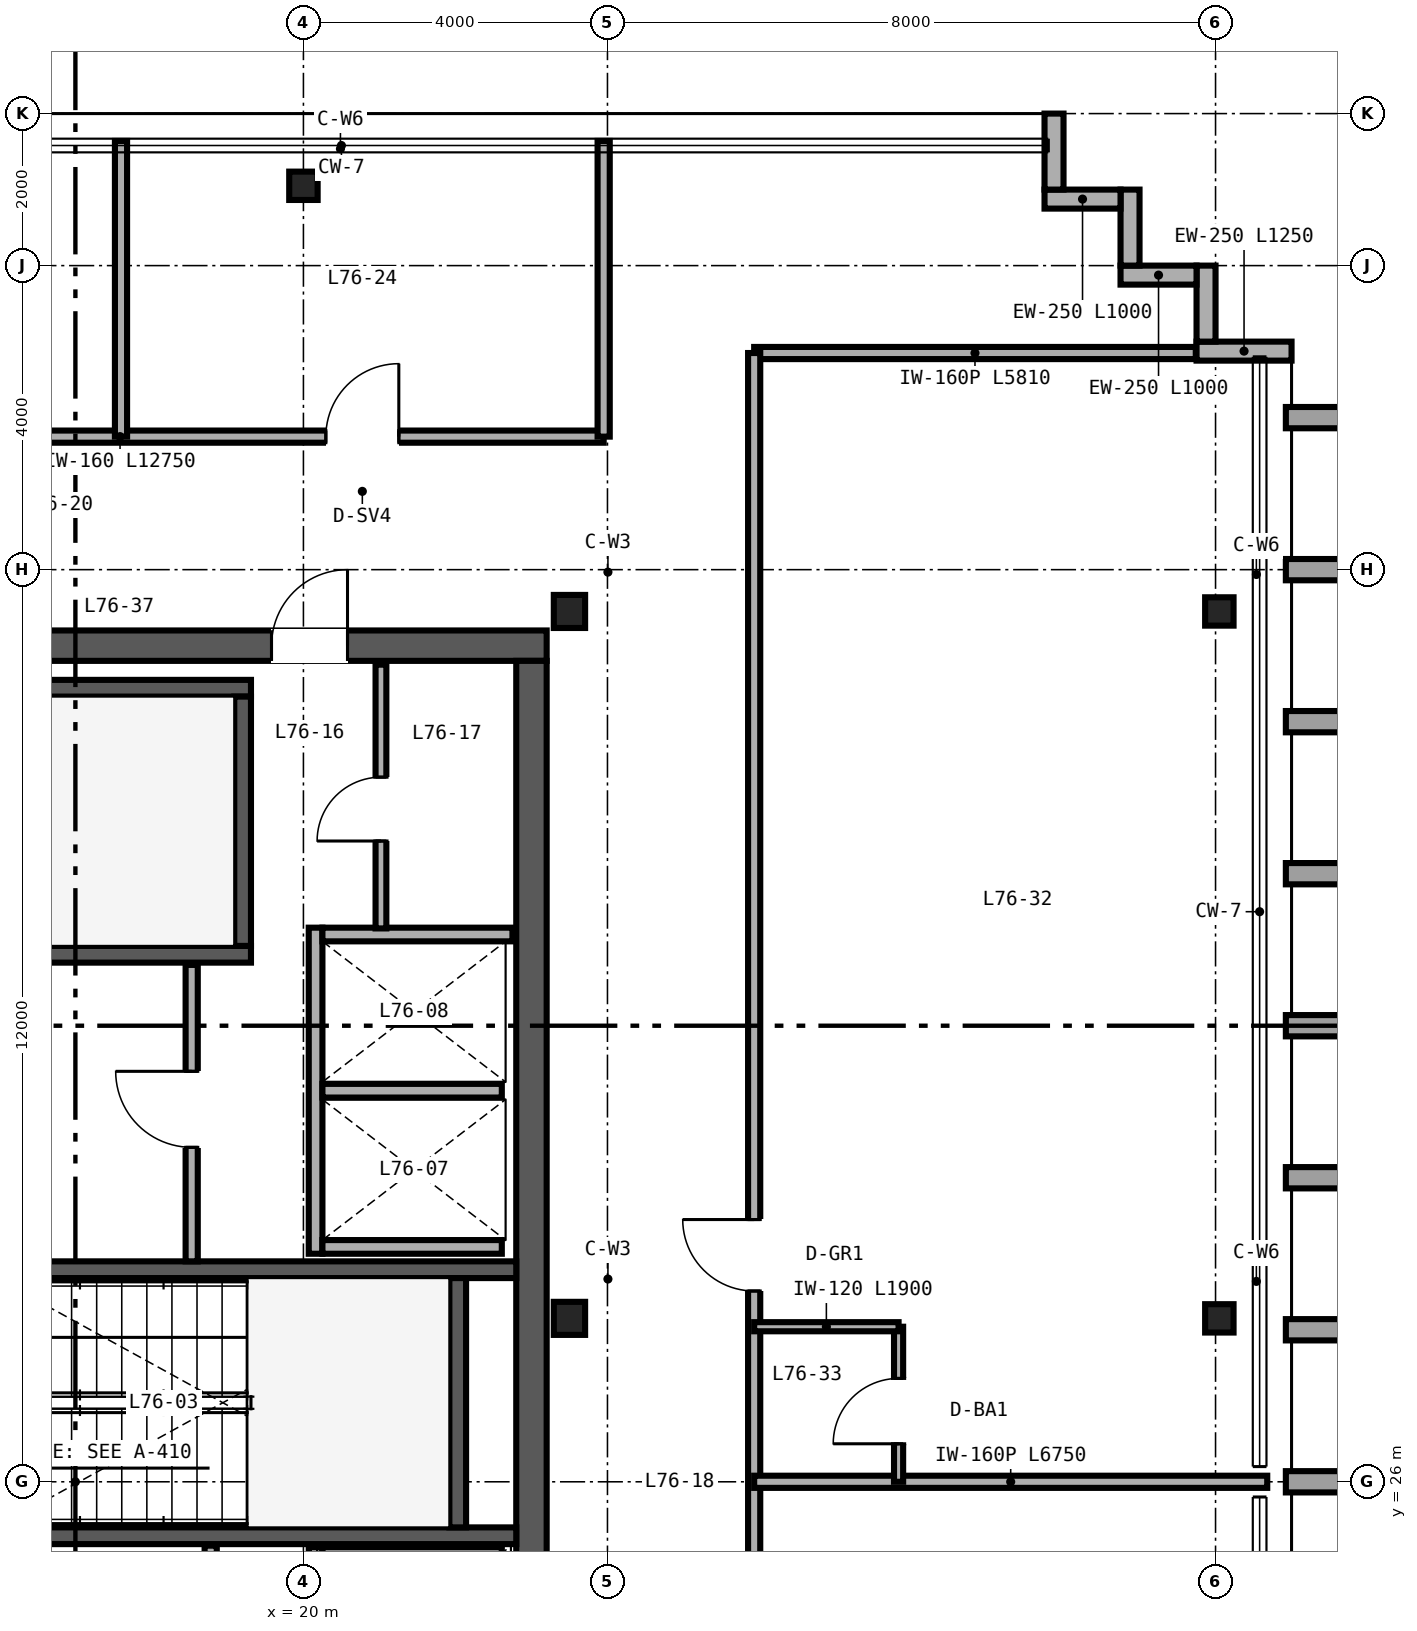
"""IFC4 building model, lengths in metres.
Left out: names, types, materials, properties, quantities, classifications, styles, units other than length and angle.
Written with IfcOpenShell. Run it as: python <this file> out.ifc"""

import sys

from ifc_helpers import new_model, si_unit, direction, frame, frame_2d, origin, origin_2d, place, context, subcontext, project, spatial, rectangle, i_section, extrude, source, transform, mapped, element, fill, save


model = new_model("IFC4")
c1 = context("Model", 3, precision=1e-05, world=origin(), true_north=direction((0.0, 1.0)))
c2 = subcontext(c1, "Body", "Model", "MODEL_VIEW")
j1 = project(units=[si_unit("LENGTHUNIT", "METRE"), si_unit("PLANEANGLEUNIT", "RADIAN")], contexts=[c1])
p1 = place(None, origin())
s1 = spatial("IfcSite", under=j1, at=p1, CompositionType="ELEMENT")
p2 = place(p1, origin())
s2 = spatial("IfcBuilding", under=s1, at=p2, CompositionType="ELEMENT")
p3 = place(p2, frame((0.0, 0.0, 297.6)))
s3 = spatial("IfcBuildingStorey", under=s2, at=p3, CompositionType="ELEMENT", Elevation=297.6)
p4 = place(p3, frame((10.8, 37.0, 0.0), z_axis=(0.0, 0.0, 1.0), x_axis=(1.0, 0.0, 0.0)))
e1 = element("IfcWall", 1, at=p4, inside=s3, PredefinedType="SHEAR", context=c2, shape_type="SweptSolid", body=[
    extrude(rectangle(XDim=12.4, YDim=0.4, at=frame_2d((6.2, 0.0))), origin(), (0.0, 0.0, 1.0), 3.32),
])
p5 = place(p4, frame((8.78, 0.0, 0.0)))
e2 = element("IfcOpeningElement", 2, at=p5, cuts=e1, PredefinedType="OPENING", context=c2, shape_type="SweptSolid", body=[
    extrude(rectangle(XDim=1.0, YDim=2.15, at=frame_2d((0.5, 1.075))), frame((0.0, 0.21, 0.0), z_axis=(0.0, -1.0, 0.0), x_axis=(1.0, 0.0, 0.0)), (0.0, 0.0, 1.0), 0.42),
])
p6 = place(p3, frame((23.0, 15.2, 0.0), z_axis=(0.0, 0.0, 1.0), x_axis=(0.0, 1.0, 0.0)))
e3 = element("IfcWall", 3, at=p6, inside=s3, PredefinedType="SHEAR", context=c2, shape_type="SweptSolid", body=[
    extrude(rectangle(XDim=21.6, YDim=0.4, at=frame_2d((10.8, 0.0))), origin(), (0.0, 0.0, 1.0), 3.32),
])
p7 = place(p3, frame((11.2, 32.94, 0.0), z_axis=(0.0, 0.0, 1.0), x_axis=(1.0, 0.0, 0.0)))
e4 = element("IfcWall", 4, at=p7, inside=s3, PredefinedType="SHEAR", context=c2, shape_type="SweptSolid", body=[
    extrude(rectangle(XDim=8.11, YDim=0.22, at=frame_2d((4.055, 0.0))), origin(), (0.0, 0.0, 1.0), 3.4),
])
p8 = place(p7, frame((0.72, 0.0, 0.0)))
e5 = element("IfcOpeningElement", 5, at=p8, cuts=e4, PredefinedType="OPENING", context=c2, shape_type="SweptSolid", body=[
    extrude(rectangle(XDim=1.05, YDim=2.15, at=frame_2d((0.525, 1.075))), frame((0.0, 0.12, 0.0), z_axis=(0.0, -1.0, 0.0), x_axis=(1.0, 0.0, 0.0)), (0.0, 0.0, 1.0), 0.24),
])
p9 = place(p3, frame((11.2, 36.44, 0.0), z_axis=(0.0, 0.0, 1.0), x_axis=(1.0, 0.0, 0.0)))
e6 = element("IfcWall", 6, at=p9, inside=s3, PredefinedType="SHEAR", context=c2, shape_type="SweptSolid", body=[
    extrude(rectangle(XDim=8.11, YDim=0.22, at=frame_2d((4.055, 0.0))), origin(), (0.0, 0.0, 1.0), 3.4),
])
p10 = place(p3, frame((19.2, 33.05, 0.0), z_axis=(0.0, 0.0, 1.0), x_axis=(0.0, 1.0, 0.0)))
e7 = element("IfcWall", 7, at=p10, inside=s3, PredefinedType="SHEAR", context=c2, shape_type="SweptSolid", body=[
    extrude(rectangle(XDim=3.28, YDim=0.22, at=frame_2d((1.64, 0.0))), origin(), (0.0, 0.0, 1.0), 3.4),
])
p11 = place(p3, frame((14.18, 25.29, 0.0), z_axis=(0.0, 0.0, 1.0), x_axis=(1.0, 0.0, 0.0)))
e8 = element("IfcWall", 8, at=p11, inside=s3, PredefinedType="SHEAR", context=c2, shape_type="SweptSolid", body=[
    extrude(rectangle(XDim=8.62, YDim=0.22, at=frame_2d((4.31, 0.0))), origin(), (0.0, 0.0, 1.0), 3.4),
])
p12 = place(p11, frame((0.47, 0.0, 0.0)))
e9 = element("IfcOpeningElement", 9, at=p12, cuts=e8, PredefinedType="OPENING", context=c2, shape_type="SweptSolid", body=[
    extrude(rectangle(XDim=1.05, YDim=2.15, at=frame_2d((0.525, 1.075))), frame((0.0, 0.12, 0.0), z_axis=(0.0, -1.0, 0.0), x_axis=(1.0, 0.0, 0.0)), (0.0, 0.0, 1.0), 0.24),
])
p13 = place(p3, frame((14.18, 28.79, 0.0), z_axis=(0.0, 0.0, 1.0), x_axis=(1.0, 0.0, 0.0)))
e10 = element("IfcWall", 10, at=p13, inside=s3, PredefinedType="SHEAR", context=c2, shape_type="SweptSolid", body=[
    extrude(rectangle(XDim=8.62, YDim=0.22, at=frame_2d((4.31, 0.0))), origin(), (0.0, 0.0, 1.0), 3.4),
])
p14 = place(p3, frame((22.03, 25.4, 0.0), z_axis=(0.0, 0.0, 1.0), x_axis=(0.0, 1.0, 0.0)))
e11 = element("IfcWall", 11, at=p14, inside=s3, PredefinedType="SHEAR", context=c2, shape_type="SweptSolid", body=[
    extrude(rectangle(XDim=3.28, YDim=0.22, at=frame_2d((1.64, 0.0))), origin(), (0.0, 0.0, 1.0), 3.4),
])
m1 = source(origin(), c2, "Body", "SweptSolid", [
    extrude(i_section(OverallWidth=0.412, OverallDepth=0.435, WebThickness=0.036, FlangeThickness=0.057, FilletRadius=0.025, at=origin_2d()), origin(), (0.0, 0.0, 1.0), 3.32),
])
for number, where, z_axis, x_axis in (
    (12, (23.5, 28.15, 0.0), (0.0, 0.0, 1.0), (1.0, 0.0, 0.0)),
    (13, (23.5, 37.45, 0.0), (0.0, 0.0, 1.0), (1.0, 0.0, 0.0)),
):
    element("IfcColumn", number, at=place(p3, frame(where, z_axis=z_axis, x_axis=x_axis)), inside=s3, PredefinedType="COLUMN", context=c2, shape_type="MappedRepresentation", body=[
        mapped(m1, transform((0.0, 0.0, 0.0), scale=1.0)),
    ])
m2 = source(origin(), c2, "Body", "SweptSolid", [
    extrude(i_section(OverallWidth=0.374, OverallDepth=0.373, WebThickness=0.016, FlangeThickness=0.026, FilletRadius=0.025, at=origin_2d()), origin(), (0.0, 0.0, 1.0), 3.32),
])
for number, where, z_axis, x_axis in (
    (14, (20.0, 43.05, 0.0), (0.0, 0.0, 1.0), (1.0, 0.0, 0.0)),
    (15, (32.05, 28.15, 0.0), (0.0, 0.0, 1.0), (1.0, 0.0, 0.0)),
    (16, (32.05, 37.45, 0.0), (0.0, 0.0, 1.0), (1.0, 0.0, 0.0)),
):
    element("IfcColumn", number, at=place(p3, frame(where, z_axis=z_axis, x_axis=x_axis)), inside=s3, PredefinedType="COLUMN", context=c2, shape_type="MappedRepresentation", body=[
        mapped(m2, transform((0.0, 0.0, 0.0), scale=1.0)),
    ])
p15 = place(p3, frame((33.0, 40.875, 0.0), z_axis=(0.0, 0.0, 1.0), x_axis=(-1.0, 0.0, 0.0)))
e17 = element("IfcWall", 17, at=p15, inside=s3, PredefinedType="SOLIDWALL", context=c2, shape_type="SweptSolid", body=[
    extrude(rectangle(XDim=1.25, YDim=0.25, at=frame_2d((0.625, 0.0))), origin(), (0.0, 0.0, 1.0), 3.32),
])
for number, where, z_axis, x_axis in (
    (18, (31.875, 41.0, 0.0), (0.0, 0.0, 1.0), (0.0, 1.0, 0.0)),
    (19, (31.75, 41.875, 0.0), (0.0, 0.0, 1.0), (-1.0, 0.0, 0.0)),
    (20, (30.875, 42.0, 0.0), (0.0, 0.0, 1.0), (0.0, 1.0, 0.0)),
    (21, (30.75, 42.875, 0.0), (0.0, 0.0, 1.0), (-1.0, 0.0, 0.0)),
    (22, (29.875, 43.0, 0.0), (0.0, 0.0, 1.0), (0.0, 1.0, 0.0)),
):
    element("IfcWall", number, at=place(p3, frame(where, z_axis=z_axis, x_axis=x_axis)), inside=s3, PredefinedType="SOLIDWALL", context=c2, shape_type="SweptSolid", body=[
        extrude(rectangle(XDim=1.0, YDim=0.25, at=frame_2d((0.5, 0.0))), origin(), (0.0, 0.0, 1.0), 3.32),
    ])
p16 = place(p3, frame((20.16, 18.82, 0.0), z_axis=(0.0, 0.0, 1.0), x_axis=(0.0, 1.0, 0.0)))
e23 = element("IfcWall", 23, at=p16, inside=s3, PredefinedType="SOLIDWALL", context=c2, shape_type="SweptSolid", body=[
    extrude(rectangle(XDim=6.32, YDim=0.18, at=frame_2d((3.16, 0.0))), origin(), (0.0, 0.0, 1.0), 2.42),
])
p17 = place(p16, frame((0.555, 0.0, 0.0)))
e24 = element("IfcOpeningElement", 24, at=p17, cuts=e23, PredefinedType="OPENING", context=c2, shape_type="SweptSolid", body=[
    extrude(rectangle(XDim=1.1, YDim=2.2, at=frame_2d((0.55, 1.1))), frame((0.0, 0.1, 0.0), z_axis=(0.0, -1.0, 0.0), x_axis=(1.0, 0.0, 0.0)), (0.0, 0.0, 1.0), 0.2),
])
p18 = place(p16, frame((2.635, 0.0, 0.0)))
e25 = element("IfcOpeningElement", 25, at=p18, cuts=e23, PredefinedType="OPENING", context=c2, shape_type="SweptSolid", body=[
    extrude(rectangle(XDim=1.1, YDim=2.2, at=frame_2d((0.55, 1.1))), frame((0.0, 0.1, 0.0), z_axis=(0.0, -1.0, 0.0), x_axis=(1.0, 0.0, 0.0)), (0.0, 0.0, 1.0), 0.2),
])
p19 = place(p16, frame((4.69, 0.0, 0.0)))
e26 = element("IfcOpeningElement", 26, at=p19, cuts=e23, PredefinedType="OPENING", context=c2, shape_type="SweptSolid", body=[
    extrude(rectangle(XDim=1.1, YDim=2.2, at=frame_2d((0.55, 1.1))), frame((0.0, 0.1, 0.0), z_axis=(0.0, -1.0, 0.0), x_axis=(1.0, 0.0, 0.0)), (0.0, 0.0, 1.0), 0.2),
])
p20 = place(p3, frame((20.25, 25.05, 0.0), z_axis=(0.0, 0.0, 1.0), x_axis=(1.0, 0.0, 0.0)))
e27 = element("IfcWall", 27, at=p20, inside=s3, PredefinedType="SOLIDWALL", context=c2, shape_type="SweptSolid", body=[
    extrude(rectangle(XDim=2.36, YDim=0.18, at=frame_2d((1.18, 0.0))), origin(), (0.0, 0.0, 1.0), 3.32),
])
p21 = place(p3, frame((20.16, 29.0, 0.0), z_axis=(0.0, 0.0, 1.0), x_axis=(0.0, 1.0, 0.0)))
e28 = element("IfcWall", 28, at=p21, inside=s3, PredefinedType="SOLIDWALL", context=c2, shape_type="SweptSolid", body=[
    extrude(rectangle(XDim=4.29, YDim=0.18, at=frame_2d((2.145, 0.0))), origin(), (0.0, 0.0, 1.0), 3.32),
])
p22 = place(p3, frame((20.25, 29.09, 0.0), z_axis=(0.0, 0.0, 1.0), x_axis=(1.0, 0.0, 0.0)))
e29 = element("IfcWall", 29, at=p22, inside=s3, PredefinedType="SOLIDWALL", context=c2, shape_type="SweptSolid", body=[
    extrude(rectangle(XDim=2.36, YDim=0.18, at=frame_2d((1.18, 0.0))), origin(), (0.0, 0.0, 1.0), 3.32),
])
p23 = place(p3, frame((20.25, 33.2, 0.0), z_axis=(0.0, 0.0, 1.0), x_axis=(1.0, 0.0, 0.0)))
e30 = element("IfcWall", 30, at=p23, inside=s3, PredefinedType="SOLIDWALL", context=c2, shape_type="SweptSolid", body=[
    extrude(rectangle(XDim=2.5, YDim=0.18, at=frame_2d((1.25, 0.0))), origin(), (0.0, 0.0, 1.0), 3.32),
])
p24 = place(p3, frame((20.25, 31.145, 0.0), z_axis=(0.0, 0.0, 1.0), x_axis=(1.0, 0.0, 0.0)))
e31 = element("IfcWall", 31, at=p24, inside=s3, PredefinedType="SOLIDWALL", context=c2, shape_type="SweptSolid", body=[
    extrude(rectangle(XDim=2.36, YDim=0.18, at=frame_2d((1.18, 0.0))), origin(), (0.0, 0.0, 1.0), 3.32),
])
p25 = place(p3, frame((18.78, 21.35, 0.0), z_axis=(0.0, 0.0, 1.0), x_axis=(0.0, 1.0, 0.0)))
e32 = element("IfcWall", 32, at=p25, inside=s3, PredefinedType="PARTITIONING", context=c2, shape_type="SweptSolid", body=[
    extrude(rectangle(XDim=3.81, YDim=0.16, at=frame_2d((1.905, 0.0))), origin(), (0.0, 0.0, 1.0), 3.32),
])
p26 = place(p3, frame((18.53, 28.9, 0.0), z_axis=(0.0, 0.0, 1.0), x_axis=(0.0, 1.0, 0.0)))
e33 = element("IfcWall", 33, at=p26, inside=s3, PredefinedType="PARTITIONING", context=c2, shape_type="SweptSolid", body=[
    extrude(rectangle(XDim=3.9, YDim=0.16, at=frame_2d((1.95, 0.0))), origin(), (0.0, 0.0, 1.0), 3.32),
])
p27 = place(p26, frame((1.5, 0.0, 0.0)))
e34 = element("IfcOpeningElement", 34, at=p27, cuts=e33, PredefinedType="OPENING", context=c2, shape_type="SweptSolid", body=[
    extrude(rectangle(XDim=1.0, YDim=2.15, at=frame_2d((0.5, 1.075))), frame((0.0, 0.09, 0.0), z_axis=(0.0, -1.0, 0.0), x_axis=(1.0, 0.0, 0.0)), (0.0, 0.0, 1.0), 0.18),
])
p28 = place(p3, frame((21.02, 33.28, 0.0), z_axis=(0.0, 0.0, 1.0), x_axis=(0.0, 1.0, 0.0)))
e35 = element("IfcWall", 35, at=p28, inside=s3, PredefinedType="PARTITIONING", context=c2, shape_type="SweptSolid", body=[
    extrude(rectangle(XDim=3.47, YDim=0.142, at=frame_2d((1.735, 0.0))), origin(), (0.0, 0.0, 1.0), 3.32),
])
p29 = place(p28, frame((1.15, 0.0, 0.0)))
e36 = element("IfcOpeningElement", 36, at=p29, cuts=e35, PredefinedType="OPENING", context=c2, shape_type="SweptSolid", body=[
    extrude(rectangle(XDim=0.84, YDim=2.1, at=frame_2d((0.42, 1.05))), frame((0.0, 0.081, 0.0), z_axis=(0.0, -1.0, 0.0), x_axis=(1.0, 0.0, 0.0)), (0.0, 0.0, 1.0), 0.162),
])
p30 = place(p3, frame((11.2, 39.75, 0.0), z_axis=(0.0, 0.0, 1.0), x_axis=(1.0, 0.0, 0.0)))
e37 = element("IfcWall", 37, at=p30, inside=s3, PredefinedType="PARTITIONING", context=c2, shape_type="SweptSolid", body=[
    extrude(rectangle(XDim=12.75, YDim=0.16, at=frame_2d((6.375, 0.0))), origin(), (0.0, 0.0, 1.0), 3.32),
])
p31 = place(p30, frame((2.72, 0.0, 0.0)))
e38 = element("IfcOpeningElement", 38, at=p31, cuts=e37, PredefinedType="OPENING", context=c2, shape_type="SweptSolid", body=[
    extrude(rectangle(XDim=0.96, YDim=2.15, at=frame_2d((0.48, 1.075))), frame((0.0, 0.09, 0.0), z_axis=(0.0, -1.0, 0.0), x_axis=(1.0, 0.0, 0.0)), (0.0, 0.0, 1.0), 0.18),
])
p32 = place(p30, frame((9.095, 0.0, 0.0)))
e39 = element("IfcOpeningElement", 39, at=p32, cuts=e37, PredefinedType="OPENING", context=c2, shape_type="SweptSolid", body=[
    extrude(rectangle(XDim=0.96, YDim=2.15, at=frame_2d((0.48, 1.075))), frame((0.0, 0.09, 0.0), z_axis=(0.0, -1.0, 0.0), x_axis=(1.0, 0.0, 0.0)), (0.0, 0.0, 1.0), 0.18),
])
p33 = place(p3, frame((23.95, 39.75, 0.0), z_axis=(0.0, 0.0, 1.0), x_axis=(0.0, 1.0, 0.0)))
e40 = element("IfcWall", 40, at=p33, inside=s3, PredefinedType="PARTITIONING", context=c2, shape_type="SweptSolid", body=[
    extrude(rectangle(XDim=3.89, YDim=0.16, at=frame_2d((1.945, 0.0))), origin(), (0.0, 0.0, 1.0), 3.32),
])
p34 = place(p3, frame((17.6, 39.75, 0.0), z_axis=(0.0, 0.0, 1.0), x_axis=(0.0, 1.0, 0.0)))
e41 = element("IfcWall", 41, at=p34, inside=s3, PredefinedType="PARTITIONING", context=c2, shape_type="SweptSolid", body=[
    extrude(rectangle(XDim=3.89, YDim=0.16, at=frame_2d((1.945, 0.0))), origin(), (0.0, 0.0, 1.0), 2.627),
])
p35 = place(p3, frame((25.93, 40.85, 0.0), z_axis=(0.0, 0.0, 1.0), x_axis=(1.0, 0.0, 0.0)))
e42 = element("IfcWall", 42, at=p35, inside=s3, PredefinedType="PARTITIONING", context=c2, shape_type="SweptSolid", body=[
    extrude(rectangle(XDim=5.81, YDim=0.16, at=frame_2d((2.905, 0.0))), origin(), (0.0, 0.0, 1.0), 3.32),
])
p36 = place(p3, frame((25.93, 11.15, 0.0), z_axis=(0.0, 0.0, 1.0), x_axis=(0.0, 1.0, 0.0)))
e43 = element("IfcWall", 43, at=p36, inside=s3, PredefinedType="PARTITIONING", context=c2, shape_type="SweptSolid", body=[
    extrude(rectangle(XDim=29.7, YDim=0.16, at=frame_2d((14.85, 0.0))), origin(), (0.0, 0.0, 1.0), 2.464),
])
p37 = place(p36, frame((2.51, 0.0, 0.0)))
e44 = element("IfcOpeningElement", 44, at=p37, cuts=e43, PredefinedType="OPENING", context=c2, shape_type="SweptSolid", body=[
    extrude(rectangle(XDim=0.94, YDim=2.15, at=frame_2d((0.47, 1.075))), frame((0.0, 0.09, 0.0), z_axis=(0.0, -1.0, 0.0), x_axis=(1.0, 0.0, 0.0)), (0.0, 0.0, 1.0), 0.18),
])
p38 = place(p36, frame((17.36, 0.0, 0.0)))
e45 = element("IfcOpeningElement", 45, at=p38, cuts=e43, PredefinedType="OPENING", context=c2, shape_type="SweptSolid", body=[
    extrude(rectangle(XDim=0.94, YDim=2.15, at=frame_2d((0.47, 1.075))), frame((0.0, 0.09, 0.0), z_axis=(0.0, -1.0, 0.0), x_axis=(1.0, 0.0, 0.0)), (0.0, 0.0, 1.0), 0.18),
])
p39 = place(p3, frame((25.93, 26.0, 0.0), z_axis=(0.0, 0.0, 1.0), x_axis=(1.0, 0.0, 0.0)))
e46 = element("IfcWall", 46, at=p39, inside=s3, PredefinedType="PARTITIONING", context=c2, shape_type="SweptSolid", body=[
    extrude(rectangle(XDim=6.75, YDim=0.16, at=frame_2d((3.375, 0.0))), origin(), (0.0, 0.0, 1.0), 2.541),
])
p40 = place(p3, frame((27.83, 26.0, 0.0), z_axis=(0.0, 0.0, 1.0), x_axis=(0.0, 1.0, 0.0)))
e47 = element("IfcWall", 47, at=p40, inside=s3, PredefinedType="PARTITIONING", context=c2, shape_type="SweptSolid", body=[
    extrude(rectangle(XDim=2.04, YDim=0.12, at=frame_2d((1.02, 0.0))), origin(), (0.0, 0.0, 1.0), 2.464),
])
p41 = place(p40, frame((0.5, 0.0, 0.0)))
e48 = element("IfcOpeningElement", 48, at=p41, cuts=e47, PredefinedType="OPENING", context=c2, shape_type="SweptSolid", body=[
    extrude(rectangle(XDim=0.86, YDim=2.1, at=frame_2d((0.43, 1.05))), frame((0.0, 0.07, 0.0), z_axis=(0.0, -1.0, 0.0), x_axis=(1.0, 0.0, 0.0)), (0.0, 0.0, 1.0), 0.14),
])
p42 = place(p3, frame((25.93, 28.04, 0.0), z_axis=(0.0, 0.0, 1.0), x_axis=(1.0, 0.0, 0.0)))
e49 = element("IfcWall", 49, at=p42, inside=s3, PredefinedType="PARTITIONING", context=c2, shape_type="SweptSolid", body=[
    extrude(rectangle(XDim=1.9, YDim=0.12, at=frame_2d((0.95, 0.0))), origin(), (0.0, 0.0, 1.0), 2.464),
])
m3 = source(origin(), c2, "Body", "SweptSolid", [
    extrude(rectangle(XDim=1.0, YDim=2.15, at=frame_2d((0.5, 1.075))), frame((0.0, 0.025, 0.0), z_axis=(0.0, -1.0, 0.0), x_axis=(1.0, 0.0, 0.0)), (0.0, 0.0, 1.0), 0.05),
])
p43 = place(p27, origin())
e50 = element("IfcDoor", 50, at=p43, inside=s3, OperationType="SINGLE_SWING_RIGHT", PredefinedType="DOOR", context=c2, shape_type="MappedRepresentation", body=[
    mapped(m3, transform((0.0, 0.0, 0.0), scale=1.0)),
])
fill(e34, e50)
m4 = source(origin(), c2, "Body", "SweptSolid", [
    extrude(rectangle(XDim=0.84, YDim=2.1, at=frame_2d((0.42, 1.05))), frame((0.0, 0.025, 0.0), z_axis=(0.0, -1.0, 0.0), x_axis=(1.0, 0.0, 0.0)), (0.0, 0.0, 1.0), 0.05),
])
p44 = place(p29, origin())
e51 = element("IfcDoor", 51, at=p44, inside=s3, OperationType="SINGLE_SWING_LEFT", PredefinedType="DOOR", context=c2, shape_type="MappedRepresentation", body=[
    mapped(m4, transform((0.0, 0.0, 0.0), scale=1.0)),
])
fill(e36, e51)
p45 = place(p5, origin())
e52 = element("IfcDoor", 52, at=p45, inside=s3, OperationType="SINGLE_SWING_RIGHT", PredefinedType="DOOR", context=c2, shape_type="MappedRepresentation", body=[
    mapped(m3, transform((0.0, 0.0, 0.0), scale=1.0)),
])
fill(e2, e52)
m5 = source(origin(), c2, "Body", "SweptSolid", [
    extrude(rectangle(XDim=0.96, YDim=2.15, at=frame_2d((0.48, 1.075))), frame((0.0, 0.025, 0.0), z_axis=(0.0, -1.0, 0.0), x_axis=(1.0, 0.0, 0.0)), (0.0, 0.0, 1.0), 0.05),
])
p46 = place(p32, origin())
e53 = element("IfcDoor", 53, at=p46, inside=s3, OperationType="SINGLE_SWING_RIGHT", PredefinedType="DOOR", context=c2, shape_type="MappedRepresentation", body=[
    mapped(m5, transform((0.0, 0.0, 0.0), scale=1.0)),
])
fill(e39, e53)
m6 = source(origin(), c2, "Body", "SweptSolid", [
    extrude(rectangle(XDim=0.86, YDim=2.1, at=frame_2d((0.43, 1.05))), frame((0.0, 0.025, 0.0), z_axis=(0.0, -1.0, 0.0), x_axis=(1.0, 0.0, 0.0)), (0.0, 0.0, 1.0), 0.05),
])
p47 = place(p41, origin())
e54 = element("IfcDoor", 54, at=p47, inside=s3, OperationType="SINGLE_SWING_LEFT", PredefinedType="DOOR", context=c2, shape_type="MappedRepresentation", body=[
    mapped(m6, transform((0.0, 0.0, 0.0), scale=1.0)),
])
fill(e48, e54)
m7 = source(origin(), c2, "Body", "SweptSolid", [
    extrude(rectangle(XDim=0.94, YDim=2.15, at=frame_2d((0.47, 1.075))), frame((0.0, 0.025, 0.0), z_axis=(0.0, -1.0, 0.0), x_axis=(1.0, 0.0, 0.0)), (0.0, 0.0, 1.0), 0.05),
])
p48 = place(p38, origin())
e55 = element("IfcDoor", 55, at=p48, inside=s3, OperationType="SINGLE_SWING_RIGHT", PredefinedType="DOOR", context=c2, shape_type="MappedRepresentation", body=[
    mapped(m7, transform((0.0, 0.0, 0.0), scale=1.0)),
])
fill(e45, e55)
save(model, sys.argv[1])
